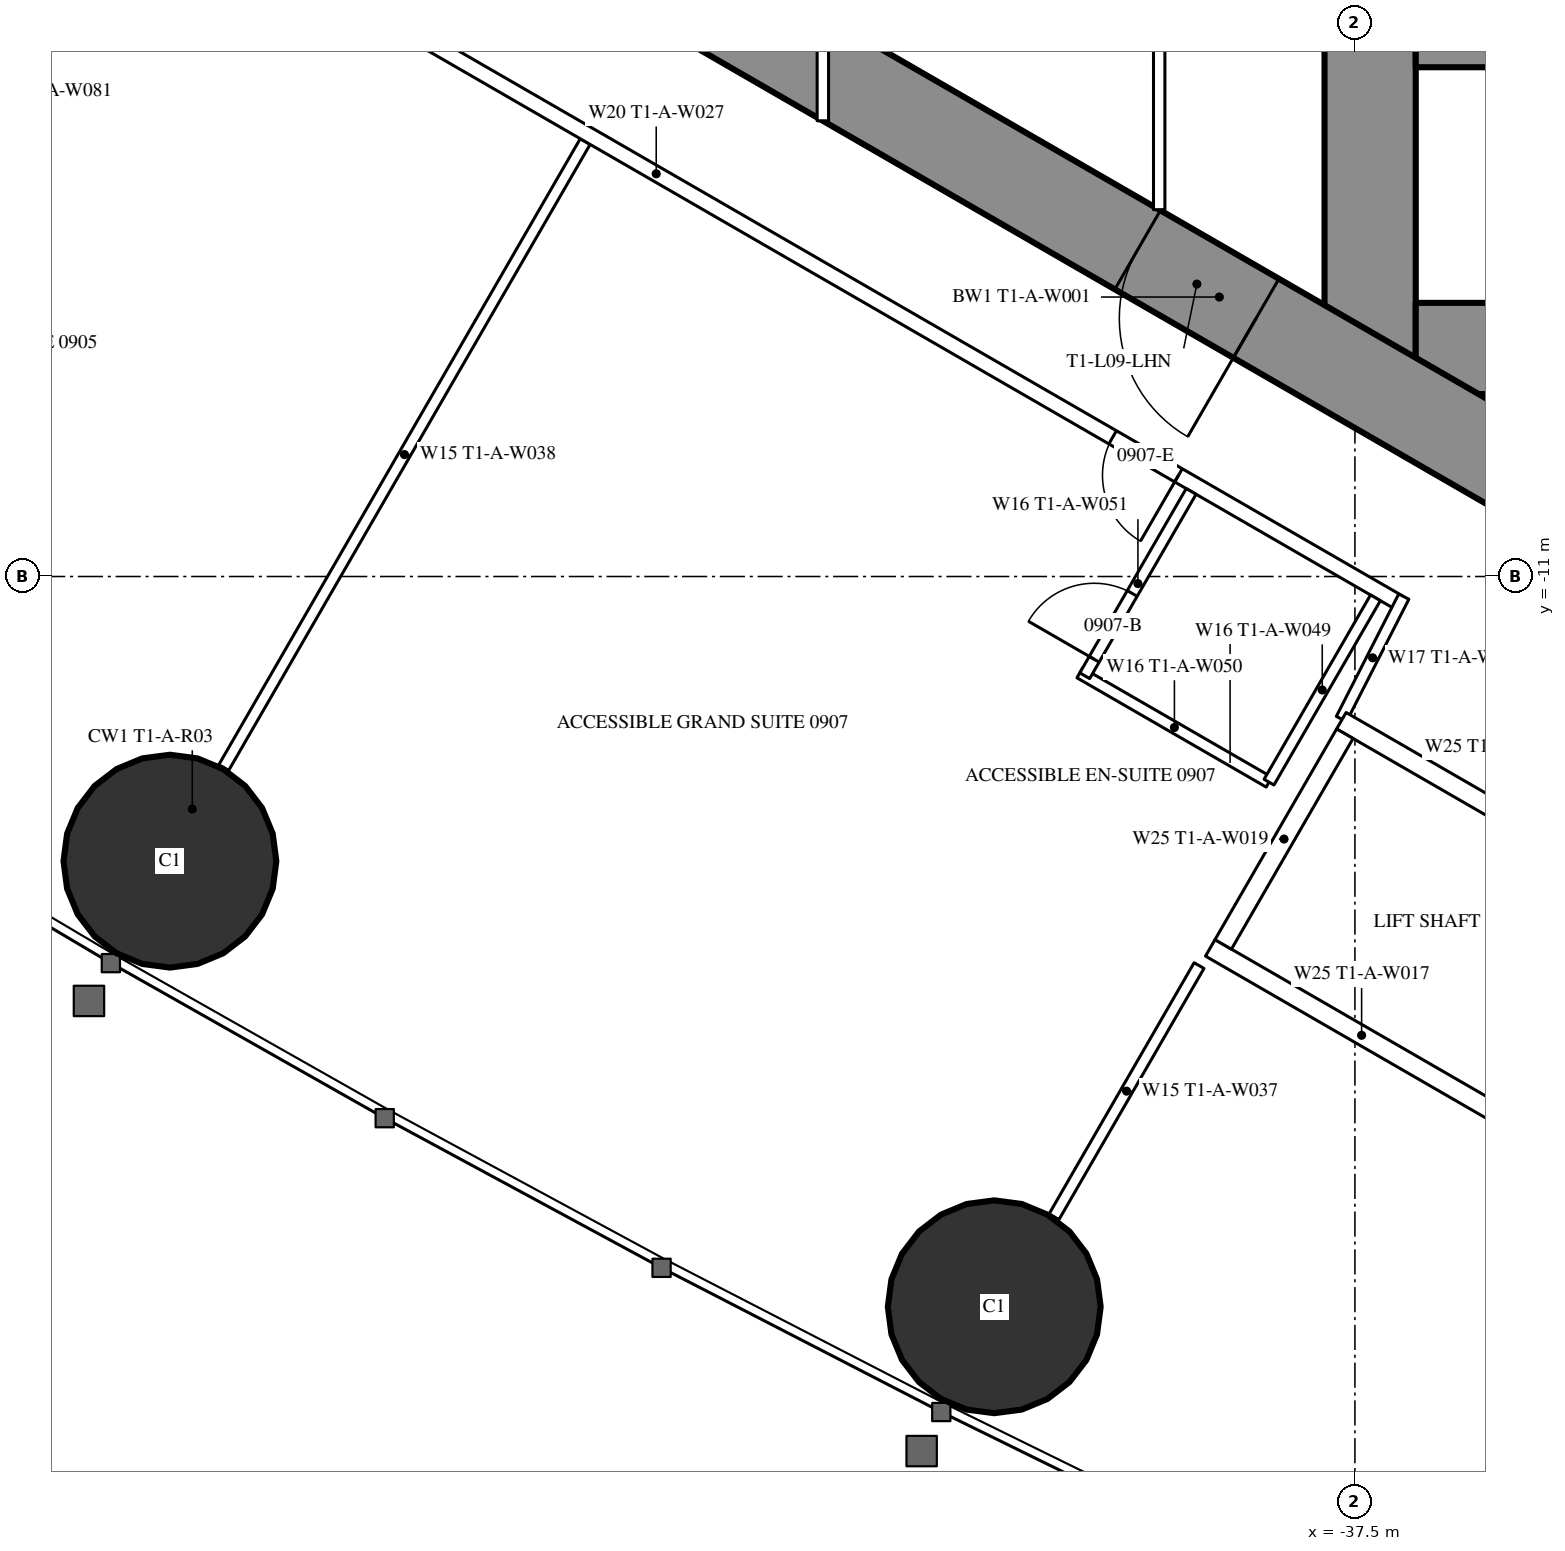
"""IFC4 building model, lengths in metres.
Left out: names, types, materials, properties, quantities, classifications, styles, units other than length and angle.
Written with IfcOpenShell. Run it as: python <this file> out.ifc"""

import sys

from ifc_helpers import new_model, si_unit, direction, frame, frame_2d, origin, origin_2d, place, context, subcontext, project, spatial, rectangle, hollow_circle, extrude, element, fill, save


model = new_model("IFC4")
c1 = context("Model", 3, precision=1e-05, world=origin(), true_north=direction((0.0, 1.0)))
c2 = subcontext(c1, "Body", "Model", "MODEL_VIEW")
j1 = project(units=[si_unit("LENGTHUNIT", "METRE"), si_unit("PLANEANGLEUNIT", "RADIAN")], contexts=[c1])
p1 = place(None, origin())
s1 = spatial("IfcSite", under=j1, at=p1, CompositionType="ELEMENT")
p2 = place(p1, origin())
s2 = spatial("IfcBuilding", under=s1, at=p2, CompositionType="ELEMENT")
p3 = place(p2, frame((0.0, 0.0, 39.0)))
s3 = spatial("IfcBuildingStorey", under=s2, at=p3, CompositionType="ELEMENT", Elevation=39.0)
for number, where, z_axis, x_axis in (
    (1, (-53.09, -14.745, 0.0), (0.0, 0.0, 1.0), (1.0, 0.0, 0.0)),
    (2, (-42.245, -20.607, 0.0), (0.0, 0.0, 1.0), (1.0, 0.0, 0.0)),
):
    element("IfcColumn", number, at=place(p3, frame(where, z_axis=z_axis, x_axis=x_axis)), inside=s3, PredefinedType="COLUMN", context=c2, shape_type="SweptSolid", body=[
        extrude(hollow_circle(Radius=1.4, WallThickness=0.12, at=origin_2d()), origin(), (0.0, 0.0, 1.0), 3.5),
    ])
p4 = place(p3, frame((-37.3, 8.6, 0.0), z_axis=(0.0, 0.0, 1.0), x_axis=(0.0, -1.0, 0.0)))
e3 = element("IfcWall", 3, at=p4, inside=s3, PredefinedType="SHEAR", context=c2, shape_type="SweptSolid", body=[
    extrude(rectangle(XDim=17.2, YDim=1.2, at=frame_2d((8.6, 0.0))), origin(), (0.0, 0.0, 1.0), 3.5),
])
p5 = place(p4, frame((7.7, 0.0, 0.0)))
e4 = element("IfcOpeningElement", 4, at=p5, cuts=e3, PredefinedType="OPENING", context=c2, shape_type="SweptSolid", body=[
    extrude(rectangle(XDim=1.8, YDim=2.2, at=frame_2d((0.9, 1.1))), frame((0.0, 0.61, 0.0), z_axis=(0.0, -1.0, 0.0), x_axis=(1.0, 0.0, 0.0)), (0.0, 0.0, 1.0), 1.22),
])
p6 = place(p3, frame((-28.3, -8.0, 0.0), z_axis=(0.0, 0.0, 1.0), x_axis=(-1.0, 0.0, 0.0)))
e5 = element("IfcWall", 5, at=p6, inside=s3, PredefinedType="SHEAR", context=c2, shape_type="SweptSolid", body=[
    extrude(rectangle(XDim=8.4, YDim=1.2, at=frame_2d((4.2, 0.0))), origin(), (0.0, 0.0, 1.0), 3.5),
])
p7 = place(p6, frame((0.25, 0.0, 0.0)))
e6 = element("IfcOpeningElement", 6, at=p7, cuts=e5, PredefinedType="OPENING", context=c2, shape_type="SweptSolid", body=[
    extrude(rectangle(XDim=1.0, YDim=2.2, at=frame_2d((0.5, 1.1))), frame((0.0, 0.61, 0.0), z_axis=(0.0, -1.0, 0.0), x_axis=(1.0, 0.0, 0.0)), (0.0, 0.0, 1.0), 1.22),
])
p8 = place(p3, frame((-28.3, -4.15, 0.0), z_axis=(0.0, 0.0, 1.0), x_axis=(-1.0, 0.0, 0.0)))
e7 = element("IfcWall", 7, at=p8, inside=s3, PredefinedType="SHEAR", context=c2, shape_type="SweptSolid", body=[
    extrude(rectangle(XDim=8.4, YDim=0.3, at=frame_2d((4.2, 0.0))), origin(), (0.0, 0.0, 1.0), 3.5),
])
p9 = place(p3, frame((-27.2, -14.3, 0.0), z_axis=(0.0, 0.0, 1.0), x_axis=(-0.866024021859, 0.500002393557, 0.0)))
e8 = element("IfcWall", 8, at=p9, inside=s3, PredefinedType="SHEAR", context=c2, shape_type="SweptSolid", body=[
    extrude(rectangle(XDim=27.907, YDim=1.2, at=frame_2d((13.954, 0.0))), origin(), (0.0, 0.0, 1.0), 3.5),
])
p10 = place(p9, frame((4.6, 0.0, 0.0)))
e9 = element("IfcOpeningElement", 9, at=p10, cuts=e8, PredefinedType="OPENING", context=c2, shape_type="SweptSolid", body=[
    extrude(rectangle(XDim=1.0, YDim=2.2, at=frame_2d((0.5, 1.1))), frame((0.0, 0.61, 0.0), z_axis=(0.0, -1.0, 0.0), x_axis=(1.0, 0.0, 0.0)), (0.0, 0.0, 1.0), 1.22),
])
p11 = place(p9, frame((13.395, 0.0, 0.0)))
e10 = element("IfcOpeningElement", 10, at=p11, cuts=e8, PredefinedType="OPENING", context=c2, shape_type="SweptSolid", body=[
    extrude(rectangle(XDim=1.8, YDim=2.2, at=frame_2d((0.9, 1.1))), frame((0.0, 0.61, 0.0), z_axis=(0.0, -1.0, 0.0), x_axis=(1.0, 0.0, 0.0)), (0.0, 0.0, 1.0), 1.22),
])
p12 = place(p3, frame((-47.627, -5.278, 0.0), z_axis=(0.0, 0.0, 1.0), x_axis=(-0.500009844318, -0.86601972009, 0.0)))
e11 = element("IfcWall", 11, at=p12, inside=s3, PredefinedType="PARTITIONING", context=c2, shape_type="SweptSolid", body=[
    extrude(rectangle(XDim=9.51, YDim=0.15, at=frame_2d((4.755, 0.0))), origin(), (0.0, 0.0, 1.0), 2.25),
])
p13 = place(p3, frame((-39.551, -16.118, 0.0), z_axis=(0.0, 0.0, 1.0), x_axis=(-0.499986503906, -0.866033195618, 0.0)))
e12 = element("IfcWall", 12, at=p13, inside=s3, PredefinedType="PARTITIONING", context=c2, shape_type="SweptSolid", body=[
    extrude(rectangle(XDim=3.815, YDim=0.15, at=frame_2d((1.907, 0.0))), origin(), (0.0, 0.0, 1.0), 3.25),
])
p14 = place(p3, frame((-36.92, -11.344, 0.0), z_axis=(0.0, 0.0, 1.0), x_axis=(-0.866028313256, 0.499994960614, 0.0)))
e13 = element("IfcWall", 13, at=p14, inside=s3, PredefinedType="PARTITIONING", context=c2, shape_type="SweptSolid", body=[
    extrude(rectangle(XDim=22.568, YDim=0.2, at=frame_2d((11.284, 0.0))), origin(), (0.0, 0.0, 1.0), 3.25),
])
p15 = place(p14, frame((21.018, 0.0, 0.0)))
e14 = element("IfcOpeningElement", 14, at=p15, cuts=e13, PredefinedType="OPENING", context=c2, shape_type="SweptSolid", body=[
    extrude(rectangle(XDim=0.95, YDim=2.2, at=frame_2d((0.475, 1.1))), frame((0.0, 0.11, 0.0), z_axis=(0.0, -1.0, 0.0), x_axis=(1.0, 0.0, 0.0)), (0.0, 0.0, 1.0), 0.22),
])
p16 = place(p14, frame((3.35, 0.0, 0.0)))
e15 = element("IfcOpeningElement", 15, at=p16, cuts=e13, PredefinedType="OPENING", context=c2, shape_type="SweptSolid", body=[
    extrude(rectangle(XDim=1.0, YDim=2.2, at=frame_2d((0.5, 1.1))), frame((0.0, 0.11, 0.0), z_axis=(0.0, -1.0, 0.0), x_axis=(1.0, 0.0, 0.0)), (0.0, 0.0, 1.0), 0.22),
])
p17 = place(p3, frame((-36.857, -11.265, 0.0), z_axis=(0.0, 0.0, 1.0), x_axis=(-0.454225294761, -0.890886851176, 0.0)))
e16 = element("IfcWall", 16, at=p17, inside=s3, PredefinedType="PARTITIONING", context=c2, shape_type="SweptSolid", body=[
    extrude(rectangle(XDim=1.807, YDim=0.15, at=frame_2d((0.904, 0.0))), origin(), (0.0, 0.0, 1.0), 3.25),
])
p18 = place(p3, frame((-38.63, -13.705, 0.0), z_axis=(0.0, 0.0, 1.0), x_axis=(-0.866018712932, 0.500011588718, 0.0)))
e17 = element("IfcWall", 17, at=p18, inside=s3, PredefinedType="PARTITIONING", context=c2, shape_type="SweptSolid", body=[
    extrude(rectangle(XDim=2.875, YDim=0.15, at=frame_2d((1.438, 0.0))), origin(), (0.0, 0.0, 1.0), 3.25),
])
p19 = place(p3, frame((-39.655, -9.88, 0.0), z_axis=(0.0, 0.0, 1.0), x_axis=(-0.500049511043, -0.865996816683, 0.0)))
e18 = element("IfcWall", 18, at=p19, inside=s3, PredefinedType="PARTITIONING", context=c2, shape_type="SweptSolid", body=[
    extrude(rectangle(XDim=2.8, YDim=0.15, at=frame_2d((1.4, 0.0))), origin(), (0.0, 0.0, 1.0), 3.25),
])
p20 = place(p19, frame((1.55, 0.0, 0.0)))
e19 = element("IfcOpeningElement", 19, at=p20, cuts=e18, PredefinedType="OPENING", context=c2, shape_type="SweptSolid", body=[
    extrude(rectangle(XDim=1.0, YDim=2.2, at=frame_2d((0.5, 1.1))), frame((0.0, 0.085, 0.0), z_axis=(0.0, -1.0, 0.0), x_axis=(1.0, 0.0, 0.0)), (0.0, 0.0, 1.0), 0.17),
])
p21 = place(p3, frame((-37.23, -11.281, 0.0), z_axis=(0.0, 0.0, 1.0), x_axis=(-0.500049511043, -0.865996816683, 0.0)))
e20 = element("IfcWall", 20, at=p21, inside=s3, PredefinedType="PARTITIONING", context=c2, shape_type="SweptSolid", body=[
    extrude(rectangle(XDim=2.8, YDim=0.15, at=frame_2d((1.4, 0.0))), origin(), (0.0, 0.0, 1.0), 3.25),
])
p22 = place(p3, frame((-40.075, 1.2, 0.0), z_axis=(0.0, 0.0, 1.0), x_axis=(0.0, -1.0, 0.0)))
e21 = element("IfcWall", 21, at=p22, inside=s3, PredefinedType="PARTITIONING", context=c2, shape_type="SweptSolid", body=[
    extrude(rectangle(XDim=7.374, YDim=0.15, at=frame_2d((3.687, 0.0))), origin(), (0.0, 0.0, 1.0), 3.25),
])
p23 = place(p22, frame((2.787, 0.0, 0.0)))
e22 = element("IfcOpeningElement", 22, at=p23, cuts=e21, PredefinedType="OPENING", context=c2, shape_type="SweptSolid", body=[
    extrude(rectangle(XDim=1.8, YDim=2.2, at=frame_2d((0.9, 1.1))), frame((0.0, 0.085, 0.0), z_axis=(0.0, -1.0, 0.0), x_axis=(1.0, 0.0, 0.0)), (0.0, 0.0, 1.0), 0.17),
])
p24 = place(p3, frame((-44.5, 5.005, 0.0), z_axis=(0.0, 0.0, 1.0), x_axis=(0.0, -1.0, 0.0)))
e23 = element("IfcWall", 23, at=p24, inside=s3, PredefinedType="PARTITIONING", context=c2, shape_type="SweptSolid", body=[
    extrude(rectangle(XDim=10.009, YDim=0.15, at=frame_2d((5.005, 0.0))), origin(), (0.0, 0.0, 1.0), 2.45),
])
p25 = place(p24, frame((4.505, 0.0, 0.0)))
e24 = element("IfcOpeningElement", 24, at=p25, cuts=e23, PredefinedType="OPENING", context=c2, shape_type="SweptSolid", body=[
    extrude(rectangle(XDim=1.0, YDim=2.2, at=frame_2d((0.5, 1.1))), frame((0.0, 0.085, 0.0), z_axis=(0.0, -1.0, 0.0), x_axis=(1.0, 0.0, 0.0)), (0.0, 0.0, 1.0), 0.17),
])
p26 = place(p3, frame((-33.696, -15.197, 0.0), z_axis=(0.0, 0.0, 1.0), x_axis=(-0.865976953817, 0.500083908417, 0.0)))
e25 = element("IfcWall", 25, at=p26, inside=s3, PredefinedType="PARTITIONING", context=c2, shape_type="SweptSolid", body=[
    extrude(rectangle(XDim=4.599, YDim=0.25, at=frame_2d((2.3, 0.0))), origin(), (0.0, 0.0, 1.0), 3.25),
])
p27 = place(p3, frame((-35.42, -18.186, 0.0), z_axis=(0.0, 0.0, 1.0), x_axis=(-0.865990227814, 0.50006092162, 0.0)))
e26 = element("IfcWall", 26, at=p27, inside=s3, PredefinedType="PARTITIONING", context=c2, shape_type="SweptSolid", body=[
    extrude(rectangle(XDim=4.6, YDim=0.25, at=frame_2d((2.3, 0.0))), origin(), (0.0, 0.0, 1.0), 3.25),
])
p28 = place(p3, frame((-37.633, -13.068, 0.0), z_axis=(0.0, 0.0, 1.0), x_axis=(-0.499872130319, -0.866099216793, 0.0)))
e27 = element("IfcWall", 27, at=p28, inside=s3, PredefinedType="PARTITIONING", context=c2, shape_type="SweptSolid", body=[
    extrude(rectangle(XDim=3.2, YDim=0.25, at=frame_2d((1.6, 0.0))), origin(), (0.0, 0.0, 1.0), 3.25),
])
p29 = place(p20, origin())
e28 = element("IfcDoor", 28, at=p29, inside=s3, OperationType="SINGLE_SWING_RIGHT", PredefinedType="DOOR", context=c2, shape_type="SweptSolid", body=[
    extrude(rectangle(XDim=1.0, YDim=2.2, at=frame_2d((0.5, 1.1))), frame((0.0, 0.025, 0.0), z_axis=(0.0, -1.0, 0.0), x_axis=(1.0, 0.0, 0.0)), (0.0, 0.0, 1.0), 0.05),
])
fill(e19, e28)
p30 = place(p16, origin())
e29 = element("IfcDoor", 29, at=p30, inside=s3, OperationType="SINGLE_SWING_LEFT", PredefinedType="DOOR", context=c2, shape_type="SweptSolid", body=[
    extrude(rectangle(XDim=1.0, YDim=2.2, at=frame_2d((0.5, 1.1))), frame((0.0, 0.025, 0.0), z_axis=(0.0, -1.0, 0.0), x_axis=(1.0, 0.0, 0.0)), (0.0, 0.0, 1.0), 0.05),
])
fill(e15, e29)
p31 = place(p11, origin())
e30 = element("IfcDoor", 30, at=p31, inside=s3, OperationType="DOUBLE_DOOR_SINGLE_SWING", PredefinedType="DOOR", context=c2, shape_type="SweptSolid", body=[
    extrude(rectangle(XDim=1.8, YDim=2.2, at=frame_2d((0.9, 1.1))), frame((0.0, 0.025, 0.0), z_axis=(0.0, -1.0, 0.0), x_axis=(1.0, 0.0, 0.0)), (0.0, 0.0, 1.0), 0.05),
])
fill(e10, e30)
save(model, sys.argv[1])
